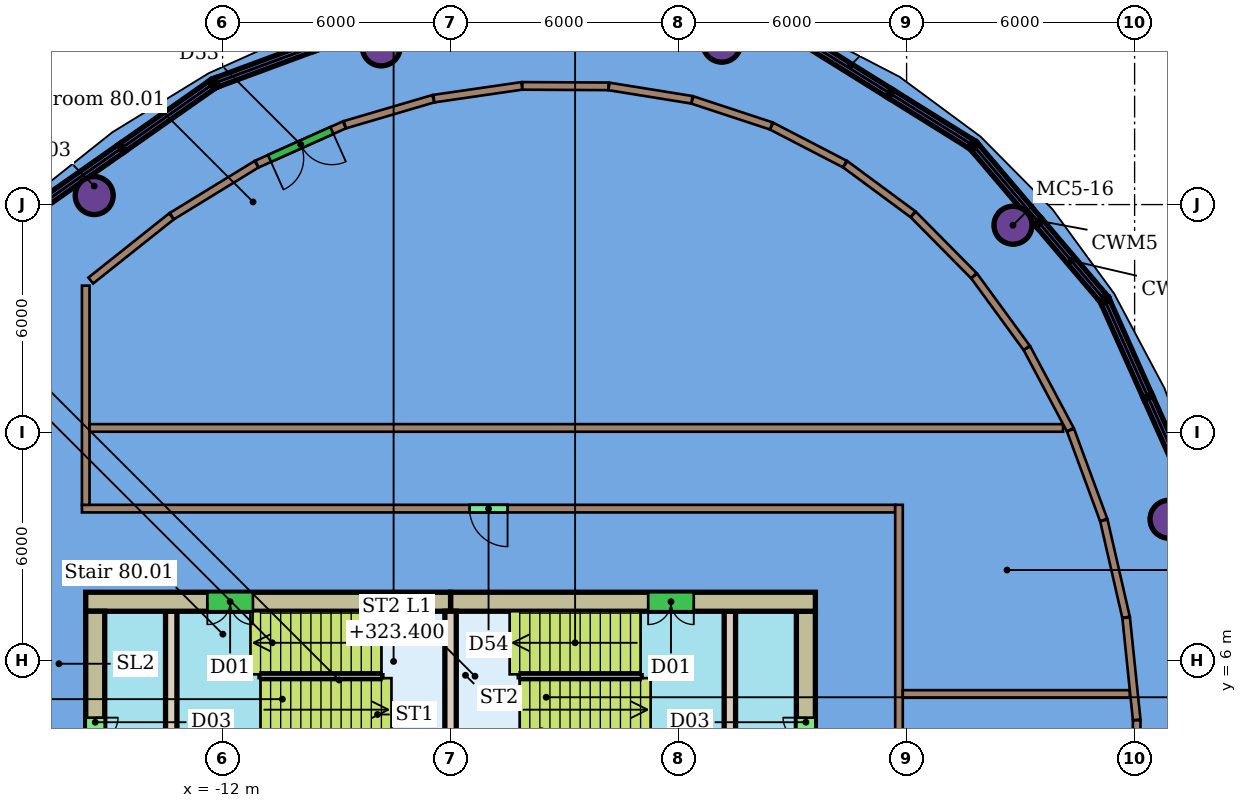
"""IFC4 building model, lengths in metres.
Left out: names, types, materials, properties, quantities, classifications, styles, units other than length and angle.
Written with IfcOpenShell. Run it as: python <this file> out.ifc"""

import sys

from ifc_helpers import new_model, si_unit, direction, frame, frame_2d, origin, origin_2d, place, context, subcontext, project, spatial, rectangle, hollow_circle, extrude, element, fill, save


model = new_model("IFC4")
c1 = context("Model", 3, precision=1e-05, world=origin(), true_north=direction((0.0, 1.0)))
c2 = subcontext(c1, "Body", "Model", "MODEL_VIEW")
j1 = project(units=[si_unit("LENGTHUNIT", "METRE"), si_unit("PLANEANGLEUNIT", "RADIAN")], contexts=[c1])
p1 = place(None, origin())
s1 = spatial("IfcSite", under=j1, at=p1, CompositionType="ELEMENT")
p2 = place(p1, origin())
s2 = spatial("IfcBuilding", under=s1, at=p2, CompositionType="ELEMENT")
p3 = place(p2, frame((0.0, 0.0, 321.3)))
s3 = spatial("IfcBuildingStorey", under=s2, at=p3, CompositionType="ELEMENT", Elevation=321.3)
for number, where, z_axis, x_axis in (
    (1, (1.138, 22.247, 0.0), (0.0, 0.0, 1.0), (1.0, 0.0, 0.0)),
    (2, (-7.825, 22.149, 0.0), (0.0, 0.0, 1.0), (1.0, 0.0, 0.0)),
    (3, (-15.377, 18.238, 0.0), (0.0, 0.0, 1.0), (1.0, 0.0, 0.0)),
    (4, (12.906, 9.72, 0.0), (0.0, 0.0, 1.0), (1.0, 0.0, 0.0)),
    (5, (8.8, 17.457, 0.0), (0.0, 0.0, 1.0), (1.0, 0.0, 0.0)),
):
    element("IfcColumn", number, at=place(p3, frame(where, z_axis=z_axis, x_axis=x_axis)), inside=s3, PredefinedType="COLUMN", context=c2, shape_type="SweptSolid", body=[
        extrude(hollow_circle(Radius=0.5, WallThickness=0.04, at=origin_2d()), origin(), (0.0, 0.0, 1.0), 4.0),
    ])
p4 = place(p3, frame((5.7, 10.0, 0.0), z_axis=(0.0, 0.0, 1.0), x_axis=(-1.0, 0.0, 0.0)))
e6 = element("IfcWall", 6, at=p4, inside=s3, PredefinedType="PARTITIONING", context=c2, shape_type="SweptSolid", body=[
    extrude(rectangle(XDim=21.4, YDim=0.2, at=frame_2d((10.7, 0.0))), origin(), (0.0, 0.0, 1.0), 3.65),
])
p5 = place(p4, frame((10.2, 0.0, 0.0)))
e7 = element("IfcOpeningElement", 7, at=p5, cuts=e6, PredefinedType="OPENING", context=c2, shape_type="SweptSolid", body=[
    extrude(rectangle(XDim=1.0, YDim=2.1, at=frame_2d((0.5, 1.05))), frame((0.0, 0.11, 0.0), z_axis=(0.0, -1.0, 0.0), x_axis=(1.0, 0.0, 0.0)), (0.0, 0.0, 1.0), 0.22),
])
p6 = place(p3, frame((5.8, -13.558, 0.0), z_axis=(0.0, 0.0, 1.0), x_axis=(0.0, 1.0, 0.0)))
e8 = element("IfcWall", 8, at=p6, inside=s3, PredefinedType="PARTITIONING", context=c2, shape_type="SweptSolid", body=[
    extrude(rectangle(XDim=23.658, YDim=0.2, at=frame_2d((11.829, 0.0))), origin(), (0.0, 0.0, 1.0), 3.65),
])
p7 = place(p3, frame((-15.6, 10.1, 0.0), z_axis=(0.0, 0.0, 1.0), x_axis=(0.0, 1.0, 0.0)))
e9 = element("IfcWall", 9, at=p7, inside=s3, PredefinedType="PARTITIONING", context=c2, shape_type="SweptSolid", body=[
    extrude(rectangle(XDim=5.767, YDim=0.2, at=frame_2d((2.884, 0.0))), origin(), (0.0, 0.0, 1.0), 3.65),
])
p8 = place(p3, frame((-15.5, 12.123, 0.0), z_axis=(0.0, 0.0, 1.0), x_axis=(1.0, 0.0, 0.0)))
e10 = element("IfcWall", 10, at=p8, inside=s3, PredefinedType="PARTITIONING", context=c2, shape_type="SweptSolid", body=[
    extrude(rectangle(XDim=25.617, YDim=0.2, at=frame_2d((12.808, 0.0))), origin(), (0.0, 0.0, 1.0), 3.65),
])
p9 = place(p3, frame((7.78, 16.119, 0.0), z_axis=(0.0, 0.0, 1.0), x_axis=(0.590082027637, -0.807343297897, 0.0)))
e11 = element("IfcWall", 11, at=p9, inside=s3, PredefinedType="PARTITIONING", context=c2, shape_type="SweptSolid", body=[
    extrude(rectangle(XDim=2.338, YDim=0.2, at=frame_2d((1.169, 0.0))), origin(), (0.0, 0.0, 1.0), 3.65),
])
p10 = place(p3, frame((9.168, 14.219, 0.0), z_axis=(0.0, 0.0, 1.0), x_axis=(0.469611304199, -0.882873276846, 0.0)))
e12 = element("IfcWall", 12, at=p10, inside=s3, PredefinedType="PARTITIONING", context=c2, shape_type="SweptSolid", body=[
    extrude(rectangle(XDim=2.426, YDim=0.2, at=frame_2d((1.213, 0.0))), origin(), (0.0, 0.0, 1.0), 3.65),
])
p11 = place(p3, frame((-15.468, 16.001, 0.0), z_axis=(0.0, 0.0, 1.0), x_axis=(0.782665833332, 0.62244212047, 0.0)))
e13 = element("IfcWall", 13, at=p11, inside=s3, PredefinedType="PARTITIONING", context=c2, shape_type="SweptSolid", body=[
    extrude(rectangle(XDim=2.712, YDim=0.2, at=frame_2d((1.356, 0.0))), origin(), (0.0, 0.0, 1.0), 3.65),
])
p12 = place(p3, frame((-13.334, 17.696, 0.0), z_axis=(0.0, 0.0, 1.0), x_axis=(0.852667029926, 0.522454721557, 0.0)))
e14 = element("IfcWall", 14, at=p12, inside=s3, PredefinedType="PARTITIONING", context=c2, shape_type="SweptSolid", body=[
    extrude(rectangle(XDim=2.614, YDim=0.2, at=frame_2d((1.307, 0.0))), origin(), (0.0, 0.0, 1.0), 3.65),
])
p13 = place(p3, frame((-8.794, 20.097, 0.0), z_axis=(0.0, 0.0, 1.0), x_axis=(-0.912552955942, -0.408958558538, 0.0)))
e15 = element("IfcWall", 15, at=p13, inside=s3, PredefinedType="PARTITIONING", context=c2, shape_type="SweptSolid", body=[
    extrude(rectangle(XDim=2.521, YDim=0.2, at=frame_2d((1.26, 0.0))), origin(), (0.0, 0.0, 1.0), 3.65),
])
p14 = place(p13, frame((0.36, 0.0, 0.0)))
e16 = element("IfcOpeningElement", 16, at=p14, cuts=e15, PredefinedType="OPENING", context=c2, shape_type="SweptSolid", body=[
    extrude(rectangle(XDim=1.8, YDim=2.4, at=frame_2d((0.9, 1.2))), frame((0.0, 0.11, 0.0), z_axis=(0.0, -1.0, 0.0), x_axis=(1.0, 0.0, 0.0)), (0.0, 0.0, 1.0), 0.22),
])
p15 = place(p3, frame((-8.781, 20.101, 0.0), z_axis=(0.0, 0.0, 1.0), x_axis=(0.95934146389, 0.28224803925, 0.0)))
e17 = element("IfcWall", 17, at=p15, inside=s3, PredefinedType="PARTITIONING", context=c2, shape_type="SweptSolid", body=[
    extrude(rectangle(XDim=2.426, YDim=0.2, at=frame_2d((1.213, 0.0))), origin(), (0.0, 0.0, 1.0), 3.65),
])
p16 = place(p3, frame((-6.439, 20.788, 0.0), z_axis=(0.0, 0.0, 1.0), x_axis=(0.989671979467, 0.143350525141, 0.0)))
e18 = element("IfcWall", 18, at=p16, inside=s3, PredefinedType="PARTITIONING", context=c2, shape_type="SweptSolid", body=[
    extrude(rectangle(XDim=2.338, YDim=0.2, at=frame_2d((1.169, 0.0))), origin(), (0.0, 0.0, 1.0), 3.65),
])
p17 = place(p3, frame((-4.11, 21.123, 0.0), z_axis=(0.0, 0.0, 1.0), x_axis=(0.999986603133, -0.005176248997, 0.0)))
e19 = element("IfcWall", 19, at=p17, inside=s3, PredefinedType="PARTITIONING", context=c2, shape_type="SweptSolid", body=[
    extrude(rectangle(XDim=2.264, YDim=0.2, at=frame_2d((1.132, 0.0))), origin(), (0.0, 0.0, 1.0), 3.65),
])
p18 = place(p3, frame((-1.831, 21.109, 0.0), z_axis=(0.0, 0.0, 1.0), x_axis=(0.987257926423, -0.159128208423, 0.0)))
e20 = element("IfcWall", 20, at=p18, inside=s3, PredefinedType="PARTITIONING", context=c2, shape_type="SweptSolid", body=[
    extrude(rectangle(XDim=2.209, YDim=0.2, at=frame_2d((1.104, 0.0))), origin(), (0.0, 0.0, 1.0), 3.65),
])
p19 = place(p3, frame((0.365, 20.752, 0.0), z_axis=(0.0, 0.0, 1.0), x_axis=(0.949852302688, -0.312698901627, 0.0)))
e21 = element("IfcWall", 21, at=p19, inside=s3, PredefinedType="PARTITIONING", context=c2, shape_type="SweptSolid", body=[
    extrude(rectangle(XDim=2.181, YDim=0.2, at=frame_2d((1.09, 0.0))), origin(), (0.0, 0.0, 1.0), 3.65),
])
p20 = place(p3, frame((2.451, 20.063, 0.0), z_axis=(0.0, 0.0, 1.0), x_axis=(0.888068415533, -0.45971131086, 0.0)))
e22 = element("IfcWall", 22, at=p20, inside=s3, PredefinedType="PARTITIONING", context=c2, shape_type="SweptSolid", body=[
    extrude(rectangle(XDim=2.165, YDim=0.2, at=frame_2d((1.082, 0.0))), origin(), (0.0, 0.0, 1.0), 3.65),
])
p21 = place(p3, frame((4.387, 19.06, 0.0), z_axis=(0.0, 0.0, 1.0), x_axis=(0.80443326696, -0.594043027909, 0.0)))
e23 = element("IfcWall", 23, at=p21, inside=s3, PredefinedType="PARTITIONING", context=c2, shape_type="SweptSolid", body=[
    extrude(rectangle(XDim=2.209, YDim=0.2, at=frame_2d((1.105, 0.0))), origin(), (0.0, 0.0, 1.0), 3.65),
])
p22 = place(p3, frame((6.177, 17.739, 0.0), z_axis=(0.0, 0.0, 1.0), x_axis=(0.703376280453, -0.710817703843, 0.0)))
e24 = element("IfcWall", 24, at=p22, inside=s3, PredefinedType="PARTITIONING", context=c2, shape_type="SweptSolid", body=[
    extrude(rectangle(XDim=2.264, YDim=0.2, at=frame_2d((1.132, 0.0))), origin(), (0.0, 0.0, 1.0), 3.65),
])
p23 = place(p3, frame((5.9, 5.123, 0.0), z_axis=(0.0, 0.0, 1.0), x_axis=(1.0, 0.0, 0.0)))
e25 = element("IfcWall", 25, at=p23, inside=s3, PredefinedType="PARTITIONING", context=c2, shape_type="SweptSolid", body=[
    extrude(rectangle(XDim=5.974, YDim=0.2, at=frame_2d((2.987, 0.0))), origin(), (0.0, 0.0, 1.0), 3.65),
])
p24 = place(p3, frame((10.314, 12.065, 0.0), z_axis=(0.0, 0.0, 1.0), x_axis=(0.34620358582, -0.938159409251, 0.0)))
e26 = element("IfcWall", 26, at=p24, inside=s3, PredefinedType="PARTITIONING", context=c2, shape_type="SweptSolid", body=[
    extrude(rectangle(XDim=2.52, YDim=0.2, at=frame_2d((1.26, 0.0))), origin(), (0.0, 0.0, 1.0), 3.65),
])
p25 = place(p3, frame((11.191, 9.689, 0.0), z_axis=(0.0, 0.0, 1.0), x_axis=(0.223324390074, -0.974744180182, 0.0)))
e27 = element("IfcWall", 27, at=p25, inside=s3, PredefinedType="PARTITIONING", context=c2, shape_type="SweptSolid", body=[
    extrude(rectangle(XDim=2.614, YDim=0.2, at=frame_2d((1.307, 0.0))), origin(), (0.0, 0.0, 1.0), 3.65),
])
p26 = place(p3, frame((11.777, 7.129, 0.0), z_axis=(0.0, 0.0, 1.0), x_axis=(0.102877560919, -0.994694027055, 0.0)))
e28 = element("IfcWall", 28, at=p26, inside=s3, PredefinedType="PARTITIONING", context=c2, shape_type="SweptSolid", body=[
    extrude(rectangle(XDim=2.701, YDim=0.2, at=frame_2d((1.35, 0.0))), origin(), (0.0, 0.0, 1.0), 3.65),
])
p27 = place(p3, frame((12.018, 1.656, 0.0), z_axis=(0.0, 0.0, 1.0), x_axis=(0.013897320686, 0.999903427576, 0.0)))
e29 = element("IfcWall", 29, at=p27, inside=s3, PredefinedType="PARTITIONING", context=c2, shape_type="SweptSolid", body=[
    extrude(rectangle(XDim=2.776, YDim=0.2, at=frame_2d((1.388, 0.0))), origin(), (0.0, 0.0, 1.0), 3.65),
])
p28 = place(p3, frame((3.6, 7.55, 0.0), z_axis=(0.0, 0.0, 1.0), x_axis=(-1.0, 0.0, 0.0)))
e30 = element("IfcWall", 30, at=p28, inside=s3, PredefinedType="SHEAR", context=c2, shape_type="SweptSolid", body=[
    extrude(rectangle(XDim=9.6, YDim=0.5, at=frame_2d((4.8, 0.0))), origin(), (0.0, 0.0, 1.0), 3.9),
])
p29 = place(p28, frame((3.2, 0.0, 0.0)))
e31 = element("IfcOpeningElement", 31, at=p29, cuts=e30, PredefinedType="OPENING", context=c2, shape_type="SweptSolid", body=[
    extrude(rectangle(XDim=1.2, YDim=2.1, at=frame_2d((0.6, 1.05))), frame((0.0, 0.26, 0.0), z_axis=(0.0, -1.0, 0.0), x_axis=(1.0, 0.0, 0.0)), (0.0, 0.0, 1.0), 0.52),
])
p30 = place(p3, frame((-6.0, 7.55, 0.0), z_axis=(0.0, 0.0, 1.0), x_axis=(-1.0, 0.0, 0.0)))
e32 = element("IfcWall", 32, at=p30, inside=s3, PredefinedType="SHEAR", context=c2, shape_type="SweptSolid", body=[
    extrude(rectangle(XDim=9.6, YDim=0.5, at=frame_2d((4.8, 0.0))), origin(), (0.0, 0.0, 1.0), 3.9),
])
p31 = place(p30, frame((5.2, 0.0, 0.0)))
e33 = element("IfcOpeningElement", 33, at=p31, cuts=e32, PredefinedType="OPENING", context=c2, shape_type="SweptSolid", body=[
    extrude(rectangle(XDim=1.2, YDim=2.1, at=frame_2d((0.6, 1.05))), frame((0.0, 0.26, 0.0), z_axis=(0.0, -1.0, 0.0), x_axis=(1.0, 0.0, 0.0)), (0.0, 0.0, 1.0), 0.52),
])
p32 = place(p3, frame((-15.35, 7.3, 0.0), z_axis=(0.0, 0.0, 1.0), x_axis=(0.0, -1.0, 0.0)))
e34 = element("IfcWall", 34, at=p32, inside=s3, PredefinedType="SHEAR", context=c2, shape_type="SweptSolid", body=[
    extrude(rectangle(XDim=14.6, YDim=0.5, at=frame_2d((7.3, 0.0))), origin(), (0.0, 0.0, 1.0), 3.9),
])
p33 = place(p32, frame((10.6, 0.0, 0.0)))
e35 = element("IfcOpeningElement", 35, at=p33, cuts=e34, PredefinedType="OPENING", context=c2, shape_type="SweptSolid", body=[
    extrude(rectangle(XDim=1.2, YDim=2.1, at=frame_2d((0.6, 1.05))), frame((0.0, 0.26, 0.0), z_axis=(0.0, -1.0, 0.0), x_axis=(1.0, 0.0, 0.0)), (0.0, 0.0, 1.0), 0.52),
])
p34 = place(p32, frame((2.8, 0.0, 0.0)))
e36 = element("IfcOpeningElement", 36, at=p34, cuts=e34, PredefinedType="OPENING", context=c2, shape_type="SweptSolid", body=[
    extrude(rectangle(XDim=1.2, YDim=2.1, at=frame_2d((0.6, 1.05))), frame((0.0, 0.26, 0.0), z_axis=(0.0, -1.0, 0.0), x_axis=(1.0, 0.0, 0.0)), (0.0, 0.0, 1.0), 0.52),
])
p35 = place(p3, frame((3.35, -7.3, 0.0), z_axis=(0.0, 0.0, 1.0), x_axis=(0.0, 1.0, 0.0)))
e37 = element("IfcWall", 37, at=p35, inside=s3, PredefinedType="SHEAR", context=c2, shape_type="SweptSolid", body=[
    extrude(rectangle(XDim=14.6, YDim=0.5, at=frame_2d((7.3, 0.0))), origin(), (0.0, 0.0, 1.0), 3.9),
])
p36 = place(p35, frame((2.8, 0.0, 0.0)))
e38 = element("IfcOpeningElement", 38, at=p36, cuts=e37, PredefinedType="OPENING", context=c2, shape_type="SweptSolid", body=[
    extrude(rectangle(XDim=1.2, YDim=2.1, at=frame_2d((0.6, 1.05))), frame((0.0, 0.26, 0.0), z_axis=(0.0, -1.0, 0.0), x_axis=(1.0, 0.0, 0.0)), (0.0, 0.0, 1.0), 0.52),
])
p37 = place(p35, frame((10.6, 0.0, 0.0)))
e39 = element("IfcOpeningElement", 39, at=p37, cuts=e37, PredefinedType="OPENING", context=c2, shape_type="SweptSolid", body=[
    extrude(rectangle(XDim=1.2, YDim=2.1, at=frame_2d((0.6, 1.05))), frame((0.0, 0.26, 0.0), z_axis=(0.0, -1.0, 0.0), x_axis=(1.0, 0.0, 0.0)), (0.0, 0.0, 1.0), 0.52),
])
p38 = place(p3, frame((-13.35, 7.3, 0.0), z_axis=(0.0, 0.0, 1.0), x_axis=(0.0, -1.0, 0.0)))
e40 = element("IfcWall", 40, at=p38, inside=s3, PredefinedType="SHEAR", context=c2, shape_type="SweptSolid", body=[
    extrude(rectangle(XDim=14.6, YDim=0.3, at=frame_2d((7.3, 0.0))), origin(), (0.0, 0.0, 1.0), 3.9),
])
p39 = place(p38, frame((6.55, 0.0, 0.0)))
e41 = element("IfcOpeningElement", 41, at=p39, cuts=e40, PredefinedType="OPENING", context=c2, shape_type="SweptSolid", body=[
    extrude(rectangle(XDim=1.5, YDim=2.1, at=frame_2d((0.75, 1.05))), frame((0.0, 0.16, 0.0), z_axis=(0.0, -1.0, 0.0), x_axis=(1.0, 0.0, 0.0)), (0.0, 0.0, 1.0), 0.32),
])
p40 = place(p3, frame((1.35, -7.3, 0.0), z_axis=(0.0, 0.0, 1.0), x_axis=(0.0, 1.0, 0.0)))
e42 = element("IfcWall", 42, at=p40, inside=s3, PredefinedType="SHEAR", context=c2, shape_type="SweptSolid", body=[
    extrude(rectangle(XDim=14.6, YDim=0.3, at=frame_2d((7.3, 0.0))), origin(), (0.0, 0.0, 1.0), 3.9),
])
p41 = place(p40, frame((1.21, 0.0, 0.0)))
e43 = element("IfcOpeningElement", 43, at=p41, cuts=e42, PredefinedType="OPENING", context=c2, shape_type="SweptSolid", body=[
    extrude(rectangle(XDim=1.0, YDim=2.1, at=frame_2d((0.5, 1.05))), frame((0.0, 0.16, 0.0), z_axis=(0.0, -1.0, 0.0), x_axis=(1.0, 0.0, 0.0)), (0.0, 0.0, 1.0), 0.32),
])
p42 = place(p40, frame((6.55, 0.0, 0.0)))
e44 = element("IfcOpeningElement", 44, at=p42, cuts=e42, PredefinedType="OPENING", context=c2, shape_type="SweptSolid", body=[
    extrude(rectangle(XDim=1.5, YDim=2.1, at=frame_2d((0.75, 1.05))), frame((0.0, 0.16, 0.0), z_axis=(0.0, -1.0, 0.0), x_axis=(1.0, 0.0, 0.0)), (0.0, 0.0, 1.0), 0.32),
])
p43 = place(p3, frame((-6.0, 3.88, 0.0), z_axis=(0.0, 0.0, 1.0), x_axis=(0.0, 1.0, 0.0)))
e45 = element("IfcWall", 45, at=p43, inside=s3, PredefinedType="SHEAR", context=c2, shape_type="SweptSolid", body=[
    extrude(rectangle(XDim=3.42, YDim=0.3, at=frame_2d((1.71, 0.0))), origin(), (0.0, 0.0, 1.0), 3.9),
])
p44 = place(p5, origin())
e46 = element("IfcDoor", 46, at=p44, inside=s3, OperationType="SINGLE_SWING_LEFT", PredefinedType="DOOR", context=c2, shape_type="SweptSolid", body=[
    extrude(rectangle(XDim=1.0, YDim=2.1, at=frame_2d((0.5, 1.05))), frame((0.0, 0.025, 0.0), z_axis=(0.0, -1.0, 0.0), x_axis=(1.0, 0.0, 0.0)), (0.0, 0.0, 1.0), 0.05),
])
fill(e7, e46)
p45 = place(p14, origin())
e47 = element("IfcDoor", 47, at=p45, inside=s3, OperationType="DOUBLE_DOOR_SINGLE_SWING", PredefinedType="DOOR", context=c2, shape_type="SweptSolid", body=[
    extrude(rectangle(XDim=1.8, YDim=2.4, at=frame_2d((0.9, 1.2))), frame((0.0, 0.025, 0.0), z_axis=(0.0, -1.0, 0.0), x_axis=(1.0, 0.0, 0.0)), (0.0, 0.0, 1.0), 0.05),
])
fill(e16, e47)
p46 = place(p29, origin())
e48 = element("IfcDoor", 48, at=p46, inside=s3, OperationType="DOUBLE_DOOR_SINGLE_SWING", PredefinedType="NOTDEFINED", context=c2, shape_type="SweptSolid", body=[
    extrude(rectangle(XDim=1.2, YDim=2.1, at=frame_2d((0.6, 1.05))), frame((0.0, 0.025, 0.0), z_axis=(0.0, -1.0, 0.0), x_axis=(1.0, 0.0, 0.0)), (0.0, 0.0, 1.0), 0.05),
])
fill(e31, e48)
p47 = place(p31, origin())
e49 = element("IfcDoor", 49, at=p47, inside=s3, OperationType="DOUBLE_DOOR_SINGLE_SWING", PredefinedType="NOTDEFINED", context=c2, shape_type="SweptSolid", body=[
    extrude(rectangle(XDim=1.2, YDim=2.1, at=frame_2d((0.6, 1.05))), frame((0.0, 0.025, 0.0), z_axis=(0.0, -1.0, 0.0), x_axis=(1.0, 0.0, 0.0)), (0.0, 0.0, 1.0), 0.05),
])
fill(e33, e49)
p48 = place(p34, origin())
e50 = element("IfcDoor", 50, at=p48, inside=s3, OperationType="DOUBLE_DOOR_SINGLE_SWING", PredefinedType="NOTDEFINED", context=c2, shape_type="SweptSolid", body=[
    extrude(rectangle(XDim=1.2, YDim=2.1, at=frame_2d((0.6, 1.05))), frame((0.0, 0.025, 0.0), z_axis=(0.0, -1.0, 0.0), x_axis=(1.0, 0.0, 0.0)), (0.0, 0.0, 1.0), 0.05),
])
fill(e36, e50)
p49 = place(p37, origin())
e51 = element("IfcDoor", 51, at=p49, inside=s3, OperationType="DOUBLE_DOOR_SINGLE_SWING", PredefinedType="NOTDEFINED", context=c2, shape_type="SweptSolid", body=[
    extrude(rectangle(XDim=1.2, YDim=2.1, at=frame_2d((0.6, 1.05))), frame((0.0, 0.025, 0.0), z_axis=(0.0, -1.0, 0.0), x_axis=(1.0, 0.0, 0.0)), (0.0, 0.0, 1.0), 0.05),
])
fill(e39, e51)
save(model, sys.argv[1])
